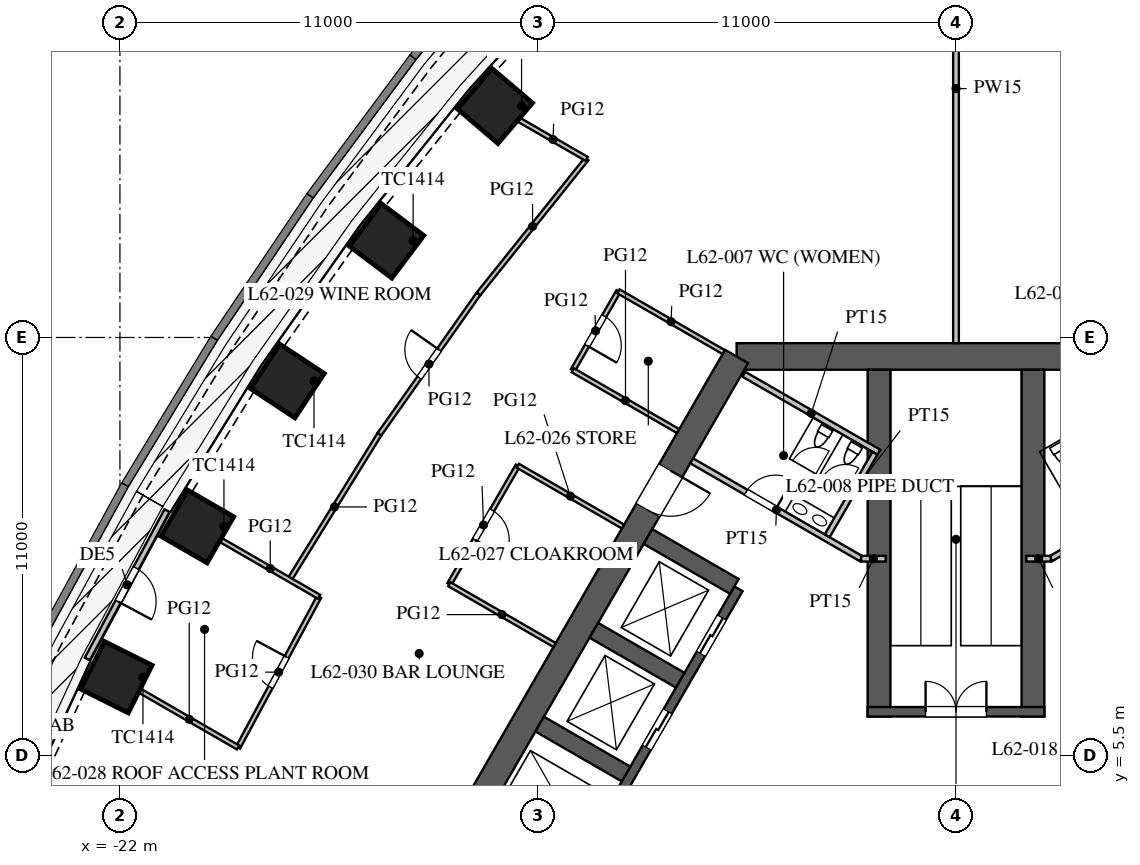
"""IFC4 building model, lengths in metres.
Left out: names, types, materials, properties, quantities, classifications, styles, units other than length and angle.
Written with IfcOpenShell. Run it as: python <this file> out.ifc"""

import sys

from ifc_helpers import new_model, si_unit, direction, frame, frame_2d, origin, origin_2d, place, context, subcontext, project, spatial, rectangle, extrude, element, fill, save


model = new_model("IFC4")
c1 = context("Model", 3, precision=1e-05, world=origin(), true_north=direction((0.0, 1.0)))
c2 = subcontext(c1, "Body", "Model", "MODEL_VIEW")
j1 = project(units=[si_unit("LENGTHUNIT", "METRE"), si_unit("PLANEANGLEUNIT", "RADIAN")], contexts=[c1])
p1 = place(None, origin())
s1 = spatial("IfcSite", under=j1, at=p1, CompositionType="ELEMENT")
p2 = place(p1, origin())
s2 = spatial("IfcBuilding", under=s1, at=p2, CompositionType="ELEMENT")
p3 = place(p2, frame((0.0, 0.0, 271.3)))
s3 = spatial("IfcBuildingStorey", under=s2, at=p3, CompositionType="ELEMENT", Elevation=271.3)
for number, where, z_axis, x_axis in (
    (1, (-12.132, 22.593, 0.0), (0.0, 0.0, 1.0), (-0.649, -0.761, 0.0)),
    (2, (-14.985, 19.044, 0.0), (0.0, 0.0, 1.0), (-0.601, -0.799, 0.0)),
    (3, (-17.594, 15.354, 0.0), (0.0, 0.0, 1.0), (-0.552, -0.834, 0.0)),
    (4, (-19.963, 11.526, 0.0), (0.0, 0.0, 1.0), (-0.5, -0.866, 0.0)),
    (5, (-22.094, 7.56, 0.0), (0.0, 0.0, 1.0), (-0.447, -0.895, 0.0)),
):
    element("IfcColumn", number, at=place(p3, frame(where, z_axis=z_axis, x_axis=x_axis)), inside=s3, PredefinedType="COLUMN", context=c2, shape_type="SweptSolid", body=[
        extrude(rectangle(XDim=1.4, YDim=1.4, at=origin_2d()), origin(), (0.0, 0.0, 1.0), 5.0),
    ])
p4 = place(p3, frame((5.773, 16.0, 0.0), z_axis=(0.0, 0.0, 1.0), x_axis=(-1.0, 0.0, 0.0)))
e6 = element("IfcWall", 6, at=p4, inside=s3, PredefinedType="SHEAR", context=c2, shape_type="SweptSolid", body=[
    extrude(rectangle(XDim=11.547, YDim=0.7, at=frame_2d((5.773, 0.0))), origin(), (0.0, 0.0, 1.0), 5.0),
])
p5 = place(p3, frame((-5.773, 16.0, 0.0), z_axis=(0.0, 0.0, 1.0), x_axis=(-0.500002442456, -0.866023993627, 0.0)))
e7 = element("IfcWall", 7, at=p5, inside=s3, PredefinedType="SHEAR", context=c2, shape_type="SweptSolid", body=[
    extrude(rectangle(XDim=21.939, YDim=0.7, at=frame_2d((10.97, 0.0))), origin(), (0.0, 0.0, 1.0), 5.0),
])
p6 = place(p5, frame((17.27, 0.0, 0.0)))
e8 = element("IfcOpeningElement", 8, at=p6, cuts=e7, PredefinedType="OPENING", context=c2, shape_type="SweptSolid", body=[
    extrude(rectangle(XDim=1.2, YDim=2.1, at=frame_2d((0.6, 1.05))), frame((0.0, 0.36, 0.0), z_axis=(0.0, -1.0, 0.0), x_axis=(1.0, 0.0, 0.0)), (0.0, 0.0, 1.0), 0.72),
])
p7 = place(p5, frame((3.47, 0.0, 0.0)))
e9 = element("IfcOpeningElement", 9, at=p7, cuts=e7, PredefinedType="OPENING", context=c2, shape_type="SweptSolid", body=[
    extrude(rectangle(XDim=1.2, YDim=2.1, at=frame_2d((0.6, 1.05))), frame((0.0, 0.36, 0.0), z_axis=(0.0, -1.0, 0.0), x_axis=(1.0, 0.0, 0.0)), (0.0, 0.0, 1.0), 0.72),
])
p8 = place(p3, frame((-5.724, 9.886, 0.0), z_axis=(0.0, 0.0, 1.0), x_axis=(-0.500001763848, -0.866024385424, 0.0)))
e10 = element("IfcWall", 10, at=p8, inside=s3, PredefinedType="SHEAR", context=c2, shape_type="SweptSolid", body=[
    extrude(rectangle(XDim=11.4, YDim=0.25, at=frame_2d((5.7, 0.0))), origin(), (0.0, 0.0, 1.0), 5.0),
])
p9 = place(p8, frame((0.875, 0.0, 0.0)))
e11 = element("IfcOpeningElement", 11, at=p9, cuts=e10, PredefinedType="OPENING", context=c2, shape_type="SweptSolid", body=[
    extrude(rectangle(XDim=1.1, YDim=2.2, at=frame_2d((0.55, 1.1))), frame((0.0, 0.135, 0.0), z_axis=(0.0, -1.0, 0.0), x_axis=(1.0, 0.0, 0.0)), (0.0, 0.0, 1.0), 0.27),
])
p10 = place(p8, frame((3.725, 0.0, 0.0)))
e12 = element("IfcOpeningElement", 12, at=p10, cuts=e10, PredefinedType="OPENING", context=c2, shape_type="SweptSolid", body=[
    extrude(rectangle(XDim=1.1, YDim=2.2, at=frame_2d((0.55, 1.1))), frame((0.0, 0.135, 0.0), z_axis=(0.0, -1.0, 0.0), x_axis=(1.0, 0.0, 0.0)), (0.0, 0.0, 1.0), 0.27),
])
p11 = place(p8, frame((6.525, 0.0, 0.0)))
e13 = element("IfcOpeningElement", 13, at=p11, cuts=e10, PredefinedType="OPENING", context=c2, shape_type="SweptSolid", body=[
    extrude(rectangle(XDim=1.2, YDim=2.2, at=frame_2d((0.6, 1.1))), frame((0.0, 0.135, 0.0), z_axis=(0.0, -1.0, 0.0), x_axis=(1.0, 0.0, 0.0)), (0.0, 0.0, 1.0), 0.27),
])
p12 = place(p8, frame((9.375, 0.0, 0.0)))
e14 = element("IfcOpeningElement", 14, at=p12, cuts=e10, PredefinedType="OPENING", context=c2, shape_type="SweptSolid", body=[
    extrude(rectangle(XDim=1.2, YDim=2.2, at=frame_2d((0.6, 1.1))), frame((0.0, 0.135, 0.0), z_axis=(0.0, -1.0, 0.0), x_axis=(1.0, 0.0, 0.0)), (0.0, 0.0, 1.0), 0.27),
])
for number, where, z_axis, x_axis in (
    (15, (-5.832, 9.949, 0.0), (0.0, 0.0, 1.0), (-0.866, 0.5, 0.0)),
    (16, (-7.257, 7.481, 0.0), (0.0, 0.0, 1.0), (-0.866, 0.5, 0.0)),
    (17, (-8.682, 5.012, 0.0), (0.0, 0.0, 1.0), (-0.866, 0.5, 0.0)),
):
    element("IfcWall", number, at=place(p3, frame(where, z_axis=z_axis, x_axis=x_axis)), inside=s3, PredefinedType="SHEAR", context=c2, shape_type="SweptSolid", body=[
        extrude(rectangle(XDim=2.625, YDim=0.45, at=frame_2d((1.312, 0.0))), origin(), (0.0, 0.0, 1.0), 5.0),
    ])
for number, where, z_axis, x_axis in (
    (18, (2.025, 6.525, 0.0), (0.0, 0.0, 1.0), (0.0, 1.0, 0.0)),
    (19, (-2.025, 6.525, 0.0), (0.0, 0.0, 1.0), (0.0, 1.0, 0.0)),
):
    element("IfcWall", number, at=place(p3, frame(where, z_axis=z_axis, x_axis=x_axis)), inside=s3, PredefinedType="SHEAR", context=c2, shape_type="SweptSolid", body=[
        extrude(rectangle(XDim=9.125, YDim=0.6, at=frame_2d((4.562, 0.0))), origin(), (0.0, 0.0, 1.0), 5.0),
    ])
p13 = place(p3, frame((2.325, 6.65, 0.0), z_axis=(0.0, 0.0, 1.0), x_axis=(-1.0, 0.0, 0.0)))
e20 = element("IfcWall", 20, at=p13, inside=s3, PredefinedType="SHEAR", context=c2, shape_type="SweptSolid", body=[
    extrude(rectangle(XDim=4.65, YDim=0.25, at=frame_2d((2.325, 0.0))), origin(), (0.0, 0.0, 1.0), 5.0),
])
p14 = place(p13, frame((1.525, 0.0, 0.0)))
e21 = element("IfcOpeningElement", 21, at=p14, cuts=e20, PredefinedType="OPENING", context=c2, shape_type="SweptSolid", body=[
    extrude(rectangle(XDim=1.6, YDim=2.1, at=frame_2d((0.8, 1.05))), frame((0.0, 0.135, 0.0), z_axis=(0.0, -1.0, 0.0), x_axis=(1.0, 0.0, 0.0)), (0.0, 0.0, 1.0), 0.27),
])
p15 = place(p3, frame((-11.229, 27.267, 0.0), z_axis=(0.0, 0.0, 1.0), x_axis=(-0.632765292047, -0.774343647989, 0.0)))
e22 = element("IfcWall", 22, at=p15, inside=s3, PredefinedType="PARAPET", context=c2, shape_type="SweptSolid", body=[
    extrude(rectangle(XDim=4.559, YDim=0.25, at=frame_2d((2.28, 0.0))), origin(), (0.0, 0.0, 1.0), 1.1),
])
p16 = place(p3, frame((-14.114, 23.737, 0.0), z_axis=(0.0, 0.0, 1.0), x_axis=(-0.59613842716, -0.802881669777, 0.0)))
e23 = element("IfcWall", 23, at=p16, inside=s3, PredefinedType="PARAPET", context=c2, shape_type="SweptSolid", body=[
    extrude(rectangle(XDim=4.53, YDim=0.25, at=frame_2d((2.265, 0.0))), origin(), (0.0, 0.0, 1.0), 1.1),
])
p17 = place(p3, frame((-16.814, 20.1, 0.0), z_axis=(0.0, 0.0, 1.0), x_axis=(-0.55850386778, -0.829501916619, 0.0)))
e24 = element("IfcWall", 24, at=p17, inside=s3, PredefinedType="PARAPET", context=c2, shape_type="SweptSolid", body=[
    extrude(rectangle(XDim=4.511, YDim=0.25, at=frame_2d((2.255, 0.0))), origin(), (0.0, 0.0, 1.0), 1.1),
])
p18 = place(p3, frame((-19.333, 16.358, 0.0), z_axis=(0.0, 0.0, 1.0), x_axis=(-0.519790350351, -0.85429385558, 0.0)))
e25 = element("IfcWall", 25, at=p18, inside=s3, PredefinedType="PARAPET", context=c2, shape_type="SweptSolid", body=[
    extrude(rectangle(XDim=4.501, YDim=0.25, at=frame_2d((2.25, 0.0))), origin(), (0.0, 0.0, 1.0), 1.1),
])
p19 = place(p3, frame((-21.673, 12.513, 0.0), z_axis=(0.0, 0.0, 1.0), x_axis=(-0.479949984371, -0.877295852322, 0.0)))
e26 = element("IfcWall", 26, at=p19, inside=s3, PredefinedType="PARAPET", context=c2, shape_type="SweptSolid", body=[
    extrude(rectangle(XDim=4.501, YDim=0.25, at=frame_2d((2.25, 0.0))), origin(), (0.0, 0.0, 1.0), 1.1),
])
p20 = place(p3, frame((-23.833, 8.564, 0.0), z_axis=(0.0, 0.0, 1.0), x_axis=(-0.43911984878, -0.898428493764, 0.0)))
e27 = element("IfcWall", 27, at=p20, inside=s3, PredefinedType="PARAPET", context=c2, shape_type="SweptSolid", body=[
    extrude(rectangle(XDim=4.511, YDim=0.25, at=frame_2d((2.255, 0.0))), origin(), (0.0, 0.0, 1.0), 1.1),
])
p21 = place(p3, frame((-20.761, 11.942, 0.0), z_axis=(0.0, 0.0, 1.0), x_axis=(-0.473567582955, -0.880757483292, 0.0)))
e28 = element("IfcWall", 28, at=p21, inside=s3, PredefinedType="SOLIDWALL", context=c2, shape_type="SweptSolid", body=[
    extrude(rectangle(XDim=4.432, YDim=0.15, at=frame_2d((2.216, 0.0))), origin(), (0.0, 0.0, 1.0), 4.98),
])
p22 = place(p21, frame((1.716, 0.0, 0.0)))
e29 = element("IfcOpeningElement", 29, at=p22, cuts=e28, PredefinedType="OPENING", context=c2, shape_type="SweptSolid", body=[
    extrude(rectangle(XDim=1.0, YDim=2.1, at=frame_2d((0.5, 1.05))), frame((0.0, 0.085, 0.0), z_axis=(0.0, -1.0, 0.0), x_axis=(1.0, 0.0, 0.0)), (0.0, 0.0, 1.0), 0.17),
])
p23 = place(p3, frame((2.495, 10.678, 0.0), z_axis=(0.0, 0.0, 1.0), x_axis=(0.866037967349, 0.499978238636, 0.0)))
e30 = element("IfcWall", 30, at=p23, inside=s3, PredefinedType="PARTITIONING", context=c2, shape_type="SweptSolid", body=[
    extrude(rectangle(XDim=5.15, YDim=0.15, at=frame_2d((2.575, 0.0))), origin(), (0.0, 0.0, 1.0), 4.8),
])
p24 = place(p23, frame((1.3, 0.0, 0.0)))
e31 = element("IfcOpeningElement", 31, at=p24, cuts=e30, PredefinedType="OPENING", context=c2, shape_type="SweptSolid", body=[
    extrude(rectangle(XDim=0.9, YDim=2.1, at=frame_2d((0.45, 1.05))), frame((0.0, 0.085, 0.0), z_axis=(0.0, -1.0, 0.0), x_axis=(1.0, 0.0, 0.0)), (0.0, 0.0, 1.0), 0.17),
])
p25 = place(p3, frame((-2.495, 10.678, 0.0), z_axis=(0.0, 0.0, 1.0), x_axis=(-0.866037967349, 0.499978238636, 0.0)))
e32 = element("IfcWall", 32, at=p25, inside=s3, PredefinedType="PARTITIONING", context=c2, shape_type="SweptSolid", body=[
    extrude(rectangle(XDim=5.15, YDim=0.15, at=frame_2d((2.575, 0.0))), origin(), (0.0, 0.0, 1.0), 4.8),
])
p26 = place(p25, frame((2.6, 0.0, 0.0)))
e33 = element("IfcOpeningElement", 33, at=p26, cuts=e32, PredefinedType="OPENING", context=c2, shape_type="SweptSolid", body=[
    extrude(rectangle(XDim=0.9, YDim=2.1, at=frame_2d((0.45, 1.05))), frame((0.0, 0.085, 0.0), z_axis=(0.0, -1.0, 0.0), x_axis=(1.0, 0.0, 0.0)), (0.0, 0.0, 1.0), 0.17),
])
for number, where, z_axis, x_axis in (
    (34, (2.495, 10.678, 0.0), (0.0, 0.0, 1.0), (-1.0, 0.0, 0.0)),
    (35, (-2.495, 10.678, 0.0), (0.0, 0.0, 1.0), (1.0, 0.0, 0.0)),
):
    element("IfcWall", number, at=place(p3, frame(where, z_axis=z_axis, x_axis=x_axis)), inside=s3, PredefinedType="PARTITIONING", context=c2, shape_type="SweptSolid", body=[
        extrude(rectangle(XDim=0.645, YDim=0.15, at=frame_2d((0.323, 0.0))), origin(), (0.0, 0.0, 1.0), 4.8),
    ])
p27 = place(p3, frame((-2.031, 13.482, 0.0), z_axis=(0.0, 0.0, 1.0), x_axis=(-0.866050731258, 0.499956128963, 0.0)))
e36 = element("IfcWall", 36, at=p27, inside=s3, PredefinedType="PARTITIONING", context=c2, shape_type="SweptSolid", body=[
    extrude(rectangle(XDim=4.1, YDim=0.15, at=frame_2d((2.05, 0.0))), origin(), (0.0, 0.0, 1.0), 4.8),
])
p28 = place(p3, frame((-3.389, 11.281, 0.0), z_axis=(0.0, 0.0, 1.0), x_axis=(0.499989096993, 0.866031698547, 0.0)))
e37 = element("IfcWall", 37, at=p28, inside=s3, PredefinedType="PARTITIONING", context=c2, shape_type="SweptSolid", body=[
    extrude(rectangle(XDim=2.51, YDim=0.15, at=frame_2d((1.255, 0.0))), origin(), (0.0, 0.0, 1.0), 4.8),
])
p29 = place(p3, frame((0.0, 16.35, 0.0), z_axis=(0.0, 0.0, 1.0), x_axis=(0.0, 1.0, 0.0)))
e38 = element("IfcWall", 38, at=p29, inside=s3, PredefinedType="PARTITIONING", context=c2, shape_type="SweptSolid", body=[
    extrude(rectangle(XDim=13.4, YDim=0.15, at=frame_2d((6.7, 0.0))), origin(), (0.0, 0.0, 1.0), 3.3),
])
p30 = place(p3, frame((-8.883, 17.715, 0.0), z_axis=(0.0, 0.0, 1.0), x_axis=(-0.500001309137, -0.866024647952, 0.0)))
e39 = element("IfcWall", 39, at=p30, inside=s3, PredefinedType="PARTITIONING", context=c2, shape_type="SweptSolid", body=[
    extrude(rectangle(XDim=2.4, YDim=0.12, at=frame_2d((1.2, 0.0))), origin(), (0.0, 0.0, 1.0), 3.6),
])
p31 = place(p30, frame((0.75, 0.0, 0.0)))
e40 = element("IfcOpeningElement", 40, at=p31, cuts=e39, PredefinedType="OPENING", context=c2, shape_type="SweptSolid", body=[
    extrude(rectangle(XDim=0.9, YDim=2.1, at=frame_2d((0.45, 1.05))), frame((0.0, 0.07, 0.0), z_axis=(0.0, -1.0, 0.0), x_axis=(1.0, 0.0, 0.0)), (0.0, 0.0, 1.0), 0.14),
])
p32 = place(p3, frame((-11.533, 13.125, 0.0), z_axis=(0.0, 0.0, 1.0), x_axis=(-0.500012057535, -0.866018442252, 0.0)))
e41 = element("IfcWall", 41, at=p32, inside=s3, PredefinedType="PARTITIONING", context=c2, shape_type="SweptSolid", body=[
    extrude(rectangle(XDim=3.6, YDim=0.12, at=frame_2d((1.8, 0.0))), origin(), (0.0, 0.0, 1.0), 3.6),
])
p33 = place(p32, frame((1.35, 0.0, 0.0)))
e42 = element("IfcOpeningElement", 42, at=p33, cuts=e41, PredefinedType="OPENING", context=c2, shape_type="SweptSolid", body=[
    extrude(rectangle(XDim=0.9, YDim=2.1, at=frame_2d((0.45, 1.05))), frame((0.0, 0.07, 0.0), z_axis=(0.0, -1.0, 0.0), x_axis=(1.0, 0.0, 0.0)), (0.0, 0.0, 1.0), 0.14),
])
p34 = place(p3, frame((-6.111, 16.115, 0.0), z_axis=(0.0, 0.0, 1.0), x_axis=(-0.866061088033, 0.499938187974, 0.0)))
e43 = element("IfcWall", 43, at=p34, inside=s3, PredefinedType="PARTITIONING", context=c2, shape_type="SweptSolid", body=[
    extrude(rectangle(XDim=3.2, YDim=0.12, at=frame_2d((1.6, 0.0))), origin(), (0.0, 0.0, 1.0), 3.6),
])
for number, where, z_axis, x_axis in (
    (44, (-10.562, 8.407, 0.0), (0.0, 0.0, 1.0), (-0.866, 0.5, 0.0)),
    (45, (-8.761, 11.525, 0.0), (0.0, 0.0, 1.0), (-0.866, 0.5, 0.0)),
    (46, (-7.312, 14.036, 0.0), (0.0, 0.0, 1.0), (-0.866, 0.5, 0.0)),
):
    element("IfcWall", number, at=place(p3, frame(where, z_axis=z_axis, x_axis=x_axis)), inside=s3, PredefinedType="PARTITIONING", context=c2, shape_type="SweptSolid", body=[
        extrude(rectangle(XDim=3.2, YDim=0.12, at=frame_2d((1.6, 0.0))), origin(), (0.0, 0.0, 1.0), 3.6),
    ])
p35 = place(p3, frame((-16.759, 9.676, 0.0), z_axis=(0.0, 0.0, 1.0), x_axis=(-0.473524102582, -0.880780860529, 0.0)))
e47 = element("IfcWall", 47, at=p35, inside=s3, PredefinedType="PARTITIONING", context=c2, shape_type="SweptSolid", body=[
    extrude(rectangle(XDim=4.502, YDim=0.12, at=frame_2d((2.251, 0.0))), origin(), (0.0, 0.0, 1.0), 3.6),
])
p36 = place(p35, frame((1.8, 0.0, 0.0)))
e48 = element("IfcOpeningElement", 48, at=p36, cuts=e47, PredefinedType="OPENING", context=c2, shape_type="SweptSolid", body=[
    extrude(rectangle(XDim=0.9, YDim=2.1, at=frame_2d((0.45, 1.05))), frame((0.0, 0.07, 0.0), z_axis=(0.0, -1.0, 0.0), x_axis=(1.0, 0.0, 0.0)), (0.0, 0.0, 1.0), 0.14),
])
p37 = place(p3, frame((-9.719, 21.199, 0.0), z_axis=(0.0, 0.0, 1.0), x_axis=(-0.625296536395, -0.780387238218, 0.0)))
e49 = element("IfcWall", 49, at=p37, inside=s3, PredefinedType="PARTITIONING", context=c2, shape_type="SweptSolid", body=[
    extrude(rectangle(XDim=4.552, YDim=0.12, at=frame_2d((2.276, 0.0))), origin(), (0.0, 0.0, 1.0), 3.6),
])
p38 = place(p3, frame((-15.17, 13.955, 0.0), z_axis=(0.0, 0.0, 1.0), x_axis=(-0.525956915034, -0.850511213052, 0.0)))
e50 = element("IfcWall", 50, at=p38, inside=s3, PredefinedType="PARTITIONING", context=c2, shape_type="SweptSolid", body=[
    extrude(rectangle(XDim=4.502, YDim=0.12, at=frame_2d((2.251, 0.0))), origin(), (0.0, 0.0, 1.0), 3.6),
])
p39 = place(p3, frame((-12.565, 17.647, 0.0), z_axis=(0.0, 0.0, 1.0), x_axis=(-0.576562277172, -0.817053205454, 0.0)))
e51 = element("IfcWall", 51, at=p39, inside=s3, PredefinedType="PARTITIONING", context=c2, shape_type="SweptSolid", body=[
    extrude(rectangle(XDim=4.519, YDim=0.12, at=frame_2d((2.259, 0.0))), origin(), (0.0, 0.0, 1.0), 3.6),
])
p40 = place(p39, frame((1.8, 0.0, 0.0)))
e52 = element("IfcOpeningElement", 52, at=p40, cuts=e51, PredefinedType="OPENING", context=c2, shape_type="SweptSolid", body=[
    extrude(rectangle(XDim=0.9, YDim=2.1, at=frame_2d((0.45, 1.05))), frame((0.0, 0.07, 0.0), z_axis=(0.0, -1.0, 0.0), x_axis=(1.0, 0.0, 0.0)), (0.0, 0.0, 1.0), 0.14),
])
p41 = place(p3, frame((-16.759, 9.676, 0.0), z_axis=(0.0, 0.0, 1.0), x_axis=(-0.866003515251, 0.500037910135, 0.0)))
e53 = element("IfcWall", 53, at=p41, inside=s3, PredefinedType="PARTITIONING", context=c2, shape_type="SweptSolid", body=[
    extrude(rectangle(XDim=2.97, YDim=0.12, at=frame_2d((1.485, 0.0))), origin(), (0.0, 0.0, 1.0), 3.4),
])
p42 = place(p3, frame((-18.891, 5.71, 0.0), z_axis=(0.0, 0.0, 1.0), x_axis=(-0.866032134716, 0.499988341504, 0.0)))
e54 = element("IfcWall", 54, at=p42, inside=s3, PredefinedType="PARTITIONING", context=c2, shape_type="SweptSolid", body=[
    extrude(rectangle(XDim=2.967, YDim=0.12, at=frame_2d((1.484, 0.0))), origin(), (0.0, 0.0, 1.0), 3.4),
])
p43 = place(p3, frame((-9.719, 21.199, 0.0), z_axis=(0.0, 0.0, 1.0), x_axis=(-0.866022515895, 0.500005001938, 0.0)))
e55 = element("IfcWall", 55, at=p43, inside=s3, PredefinedType="PARTITIONING", context=c2, shape_type="SweptSolid", body=[
    extrude(rectangle(XDim=2.044, YDim=0.12, at=frame_2d((1.022, 0.0))), origin(), (0.0, 0.0, 1.0), 3.2),
])
p44 = place(p22, origin())
e56 = element("IfcDoor", 56, at=p44, inside=s3, OperationType="SINGLE_SWING_RIGHT", PredefinedType="DOOR", context=c2, shape_type="SweptSolid", body=[
    extrude(rectangle(XDim=1.0, YDim=2.1, at=frame_2d((0.5, 1.05))), frame((0.0, 0.025, 0.0), z_axis=(0.0, -1.0, 0.0), x_axis=(1.0, 0.0, 0.0)), (0.0, 0.0, 1.0), 0.05),
])
fill(e29, e56)
p45 = place(p26, frame((0.9, 0.0, 0.0), z_axis=(0.0, 0.0, 1.0), x_axis=(-1.0, 0.0, 0.0)))
e57 = element("IfcDoor", 57, at=p45, inside=s3, OperationType="SINGLE_SWING_RIGHT", PredefinedType="DOOR", context=c2, shape_type="SweptSolid", body=[
    extrude(rectangle(XDim=0.9, YDim=2.1, at=frame_2d((0.45, 1.05))), frame((0.0, 0.025, 0.0), z_axis=(0.0, -1.0, 0.0), x_axis=(1.0, 0.0, 0.0)), (0.0, 0.0, 1.0), 0.05),
])
fill(e33, e57)
p46 = place(p14, frame((1.6, 0.0, 0.0), z_axis=(0.0, 0.0, 1.0), x_axis=(-1.0, 0.0, 0.0)))
e58 = element("IfcDoor", 58, at=p46, inside=s3, OperationType="DOUBLE_DOOR_SINGLE_SWING", PredefinedType="DOOR", context=c2, shape_type="SweptSolid", body=[
    extrude(rectangle(XDim=1.6, YDim=2.1, at=frame_2d((0.8, 1.05))), frame((0.0, 0.025, 0.0), z_axis=(0.0, -1.0, 0.0), x_axis=(1.0, 0.0, 0.0)), (0.0, 0.0, 1.0), 0.05),
])
fill(e21, e58)
p47 = place(p7, origin())
e59 = element("IfcDoor", 59, at=p47, inside=s3, OperationType="SINGLE_SWING_LEFT", PredefinedType="DOOR", context=c2, shape_type="SweptSolid", body=[
    extrude(rectangle(XDim=1.2, YDim=2.1, at=frame_2d((0.6, 1.05))), frame((0.0, 0.025, 0.0), z_axis=(0.0, -1.0, 0.0), x_axis=(1.0, 0.0, 0.0)), (0.0, 0.0, 1.0), 0.05),
])
fill(e9, e59)
p48 = place(p31, origin())
e60 = element("IfcDoor", 60, at=p48, inside=s3, OperationType="SINGLE_SWING_RIGHT", PredefinedType="DOOR", context=c2, shape_type="SweptSolid", body=[
    extrude(rectangle(XDim=0.9, YDim=2.1, at=frame_2d((0.45, 1.05))), frame((0.0, 0.025, 0.0), z_axis=(0.0, -1.0, 0.0), x_axis=(1.0, 0.0, 0.0)), (0.0, 0.0, 1.0), 0.05),
])
fill(e40, e60)
p49 = place(p33, origin())
e61 = element("IfcDoor", 61, at=p49, inside=s3, OperationType="SINGLE_SWING_RIGHT", PredefinedType="DOOR", context=c2, shape_type="SweptSolid", body=[
    extrude(rectangle(XDim=0.9, YDim=2.1, at=frame_2d((0.45, 1.05))), frame((0.0, 0.025, 0.0), z_axis=(0.0, -1.0, 0.0), x_axis=(1.0, 0.0, 0.0)), (0.0, 0.0, 1.0), 0.05),
])
fill(e42, e61)
p50 = place(p36, frame((0.9, 0.0, 0.0), z_axis=(0.0, 0.0, 1.0), x_axis=(-1.0, 0.0, 0.0)))
e62 = element("IfcDoor", 62, at=p50, inside=s3, OperationType="SINGLE_SWING_RIGHT", PredefinedType="DOOR", context=c2, shape_type="SweptSolid", body=[
    extrude(rectangle(XDim=0.9, YDim=2.1, at=frame_2d((0.45, 1.05))), frame((0.0, 0.025, 0.0), z_axis=(0.0, -1.0, 0.0), x_axis=(1.0, 0.0, 0.0)), (0.0, 0.0, 1.0), 0.05),
])
fill(e48, e62)
p51 = place(p40, frame((0.9, 0.0, 0.0), z_axis=(0.0, 0.0, 1.0), x_axis=(-1.0, 0.0, 0.0)))
e63 = element("IfcDoor", 63, at=p51, inside=s3, OperationType="SINGLE_SWING_RIGHT", PredefinedType="DOOR", context=c2, shape_type="SweptSolid", body=[
    extrude(rectangle(XDim=0.9, YDim=2.1, at=frame_2d((0.45, 1.05))), frame((0.0, 0.025, 0.0), z_axis=(0.0, -1.0, 0.0), x_axis=(1.0, 0.0, 0.0)), (0.0, 0.0, 1.0), 0.05),
])
fill(e52, e63)
p52 = place(p9, origin())
e64 = element("IfcDoor", 64, at=p52, inside=s3, OperationType="DOUBLE_DOOR_SLIDING", PredefinedType="DOOR", context=c2, shape_type="SweptSolid", body=[
    extrude(rectangle(XDim=1.1, YDim=2.2, at=frame_2d((0.55, 1.1))), frame((0.0, 0.025, 0.0), z_axis=(0.0, -1.0, 0.0), x_axis=(1.0, 0.0, 0.0)), (0.0, 0.0, 1.0), 0.05),
])
fill(e11, e64)
p53 = place(p10, origin())
e65 = element("IfcDoor", 65, at=p53, inside=s3, OperationType="DOUBLE_DOOR_SLIDING", PredefinedType="DOOR", context=c2, shape_type="SweptSolid", body=[
    extrude(rectangle(XDim=1.1, YDim=2.2, at=frame_2d((0.55, 1.1))), frame((0.0, 0.025, 0.0), z_axis=(0.0, -1.0, 0.0), x_axis=(1.0, 0.0, 0.0)), (0.0, 0.0, 1.0), 0.05),
])
fill(e12, e65)
save(model, sys.argv[1])
